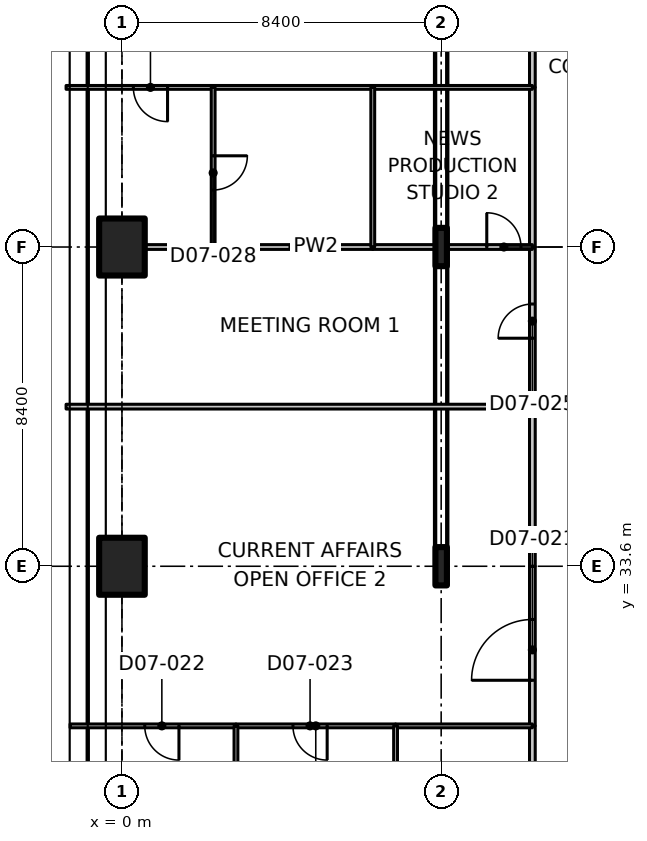
"""IFC4 building model, lengths in metres.
Left out: names, types, materials, properties, quantities, classifications, styles, units other than length and angle.
Written with IfcOpenShell. Run it as: python <this file> out.ifc"""

import sys

from ifc_helpers import new_model, si_unit, direction, frame, frame_2d, origin, origin_2d, place, context, subcontext, project, spatial, polyline, rectangle, i_section, outline, extrude, element, fill, save


model = new_model("IFC4")
c1 = context("Model", 3, precision=1e-05, world=origin(), true_north=direction((0.0, 1.0)))
c2 = subcontext(c1, "Body", "Model", "MODEL_VIEW")
j1 = project(units=[si_unit("LENGTHUNIT", "METRE"), si_unit("PLANEANGLEUNIT", "RADIAN")], contexts=[c1])
p1 = place(None, origin())
s1 = spatial("IfcSite", under=j1, at=p1, CompositionType="ELEMENT")
p2 = place(p1, origin())
s2 = spatial("IfcBuilding", under=s1, at=p2, CompositionType="ELEMENT")
p3 = place(p2, frame((0.0, 0.0, 40.1)))
s3 = spatial("IfcBuildingStorey", under=s2, at=p3, CompositionType="ELEMENT", Elevation=40.1)
for number, where, z_axis, x_axis in (
    (1, (0.0, 33.6, 0.0), (0.0, 0.0, 1.0), (1.0, 0.0, 0.0)),
    (2, (0.0, 42.0, 0.0), (0.0, 0.0, 1.0), (1.0, 0.0, 0.0)),
):
    element("IfcColumn", number, at=place(p3, frame(where, z_axis=z_axis, x_axis=x_axis)), inside=s3, PredefinedType="COLUMN", context=c2, shape_type="SweptSolid", body=[
        extrude(rectangle(XDim=1.2, YDim=1.5, at=origin_2d()), origin(), (0.0, 0.0, 1.0), 3.35),
    ])
for number, where, z_axis, x_axis in (
    (3, (8.4, 33.6, -0.125), (0.0, 0.0, 1.0), (1.0, 0.0, 0.0)),
    (4, (8.4, 42.0, -0.125), (0.0, 0.0, 1.0), (1.0, 0.0, 0.0)),
):
    element("IfcColumn", number, at=place(p3, frame(where, z_axis=z_axis, x_axis=x_axis)), inside=s3, PredefinedType="COLUMN", context=c2, shape_type="SweptSolid", body=[
        extrude(i_section(OverallWidth=0.302, OverallDepth=1.008, WebThickness=0.021, FlangeThickness=0.04, FilletRadius=0.03, at=origin_2d()), origin(), (0.0, 0.0, 1.0), 3.475),
    ])
p4 = place(p3, frame((10.8, 29.4, 0.0), z_axis=(0.0, 0.0, 1.0), x_axis=(0.0, 1.0, 0.0)))
e5 = element("IfcWall", 5, at=p4, inside=s3, PredefinedType="PARTITIONING", context=c2, shape_type="SweptSolid", body=[
    extrude(rectangle(XDim=4.2, YDim=0.15, at=frame_2d((2.1, 0.0))), origin(), (0.0, 0.0, 1.0), 3.33),
])
p5 = place(p4, frame((1.2, 0.0, 0.0)))
e6 = element("IfcOpeningElement", 6, at=p5, cuts=e5, PredefinedType="OPENING", context=c2, shape_type="SweptSolid", body=[
    extrude(rectangle(XDim=1.6, YDim=2.1, at=frame_2d((0.8, 1.05))), frame((0.0, 0.085, 0.0), z_axis=(0.0, -1.0, 0.0), x_axis=(1.0, 0.0, 0.0)), (0.0, 0.0, 1.0), 0.17),
])
for number, where, z_axis, x_axis in (
    (7, (10.8, 25.2, 0.0), (0.0, 0.0, 1.0), (0.0, 1.0, 0.0)),
    (8, (10.8, 33.6, 0.0), (0.0, 0.0, 1.0), (0.0, 1.0, 0.0)),
):
    element("IfcWall", number, at=place(p3, frame(where, z_axis=z_axis, x_axis=x_axis)), inside=s3, PredefinedType="PARTITIONING", context=c2, shape_type="SweptSolid", body=[
        extrude(rectangle(XDim=4.2, YDim=0.15, at=frame_2d((2.1, 0.0))), origin(), (0.0, 0.0, 1.0), 3.33),
    ])
p6 = place(p3, frame((10.8, 37.8, 0.0), z_axis=(0.0, 0.0, 1.0), x_axis=(0.0, 1.0, 0.0)))
e9 = element("IfcWall", 9, at=p6, inside=s3, PredefinedType="PARTITIONING", context=c2, shape_type="SweptSolid", body=[
    extrude(rectangle(XDim=4.2, YDim=0.15, at=frame_2d((2.1, 0.0))), origin(), (0.0, 0.0, 1.0), 3.33),
])
p7 = place(p6, frame((1.8, 0.0, 0.0)))
e10 = element("IfcOpeningElement", 10, at=p7, cuts=e9, PredefinedType="OPENING", context=c2, shape_type="SweptSolid", body=[
    extrude(rectangle(XDim=0.9, YDim=2.1, at=frame_2d((0.45, 1.05))), frame((0.0, 0.085, 0.0), z_axis=(0.0, -1.0, 0.0), x_axis=(1.0, 0.0, 0.0)), (0.0, 0.0, 1.0), 0.17),
])
p8 = place(p3, frame((10.8, 46.2, 0.0), z_axis=(0.0, 0.0, 1.0), x_axis=(0.0, 1.0, 0.0)))
e11 = element("IfcWall", 11, at=p8, inside=s3, PredefinedType="PARTITIONING", context=c2, shape_type="SweptSolid", body=[
    extrude(rectangle(XDim=8.4, YDim=0.15, at=frame_2d((4.2, 0.0))), origin(), (0.0, 0.0, 1.0), 3.33),
])
p9 = place(p8, frame((3.6, 0.0, 0.0)))
e12 = element("IfcOpeningElement", 12, at=p9, cuts=e11, PredefinedType="OPENING", context=c2, shape_type="SweptSolid", body=[
    extrude(rectangle(XDim=1.6, YDim=2.1, at=frame_2d((0.8, 1.05))), frame((0.0, 0.085, 0.0), z_axis=(0.0, -1.0, 0.0), x_axis=(1.0, 0.0, 0.0)), (0.0, 0.0, 1.0), 0.17),
])
p10 = place(p3, frame((10.8, 42.0, 0.0), z_axis=(0.0, 0.0, 1.0), x_axis=(0.0, 1.0, 0.0)))
e13 = element("IfcWall", 13, at=p10, inside=s3, PredefinedType="PARTITIONING", context=c2, shape_type="SweptSolid", body=[
    extrude(rectangle(XDim=4.2, YDim=0.15, at=frame_2d((2.1, 0.0))), origin(), (0.0, 0.0, 1.0), 3.33),
])
p11 = place(p3, frame((3.0, 29.4, 0.0), z_axis=(0.0, 0.0, 1.0), x_axis=(-1.0, 0.0, 0.0)))
e14 = element("IfcWall", 14, at=p11, inside=s3, PredefinedType="PARTITIONING", context=c2, shape_type="SweptSolid", body=[
    extrude(rectangle(XDim=4.365, YDim=0.1, at=frame_2d((2.183, 0.0))), origin(), (0.0, 0.0, 1.0), 2.98),
])
p12 = place(p11, frame((1.5, 0.0, 0.0)))
e15 = element("IfcOpeningElement", 15, at=p12, cuts=e14, PredefinedType="OPENING", context=c2, shape_type="SweptSolid", body=[
    extrude(rectangle(XDim=0.9, YDim=2.1, at=frame_2d((0.45, 1.05))), frame((0.0, 0.06, 0.0), z_axis=(0.0, -1.0, 0.0), x_axis=(1.0, 0.0, 0.0)), (0.0, 0.0, 1.0), 0.12),
])
p13 = place(p3, frame((7.2, 29.4, 0.0), z_axis=(0.0, 0.0, 1.0), x_axis=(-1.0, 0.0, 0.0)))
e16 = element("IfcWall", 16, at=p13, inside=s3, PredefinedType="PARTITIONING", context=c2, shape_type="SweptSolid", body=[
    extrude(rectangle(XDim=4.2, YDim=0.1, at=frame_2d((2.1, 0.0))), origin(), (0.0, 0.0, 1.0), 3.33),
])
p14 = place(p13, frame((1.8, 0.0, 0.0)))
e17 = element("IfcOpeningElement", 17, at=p14, cuts=e16, PredefinedType="OPENING", context=c2, shape_type="SweptSolid", body=[
    extrude(rectangle(XDim=0.9, YDim=2.1, at=frame_2d((0.45, 1.05))), frame((0.0, 0.06, 0.0), z_axis=(0.0, -1.0, 0.0), x_axis=(1.0, 0.0, 0.0)), (0.0, 0.0, 1.0), 0.12),
])
p15 = place(p3, frame((10.8, 29.4, 0.0), z_axis=(0.0, 0.0, 1.0), x_axis=(-1.0, 0.0, 0.0)))
e18 = element("IfcWall", 18, at=p15, inside=s3, PredefinedType="PARTITIONING", context=c2, shape_type="SweptSolid", body=[
    extrude(rectangle(XDim=3.6, YDim=0.1, at=frame_2d((1.8, 0.0))), origin(), (0.0, 0.0, 1.0), 3.33),
])
p16 = place(p3, frame((-1.47, 37.8, 0.0), z_axis=(0.0, 0.0, 1.0), x_axis=(1.0, 0.0, 0.0)))
e19 = element("IfcWall", 19, at=p16, inside=s3, PredefinedType="PARTITIONING", context=c2, shape_type="SweptSolid", body=[
    extrude(outline(polyline([(0.0, 0.0), (12.27, 0.0), (12.27, 3.33), (1.92, 3.33), (1.918, 2.98), (1.022, 2.98), (1.02, 3.33), (0.37, 3.33), (0.0, 3.33), (0.0, 0.0)])), frame((0.0, 0.062, 0.0), z_axis=(0.0, -1.0, 0.0), x_axis=(1.0, 0.0, 0.0)), (0.0, 0.0, 1.0), 0.125),
])
p17 = place(p3, frame((3.0, 29.4, 0.0), z_axis=(0.0, 0.0, 1.0), x_axis=(0.0, -1.0, 0.0)))
e20 = element("IfcWall", 20, at=p17, inside=s3, PredefinedType="PARTITIONING", context=c2, shape_type="SweptSolid", body=[
    extrude(rectangle(XDim=4.2, YDim=0.1, at=frame_2d((2.1, 0.0))), origin(), (0.0, 0.0, 1.0), 3.33),
])
p18 = place(p3, frame((7.2, 29.4, 0.0), z_axis=(0.0, 0.0, 1.0), x_axis=(0.0, -1.0, 0.0)))
e21 = element("IfcWall", 21, at=p18, inside=s3, PredefinedType="PARTITIONING", context=c2, shape_type="SweptSolid", body=[
    extrude(rectangle(XDim=4.2, YDim=0.1, at=frame_2d((2.1, 0.0))), origin(), (0.0, 0.0, 1.0), 3.33),
])
p19 = place(p18, frame((1.5, 0.0, 0.0)))
e22 = element("IfcOpeningElement", 22, at=p19, cuts=e21, PredefinedType="OPENING", context=c2, shape_type="SweptSolid", body=[
    extrude(rectangle(XDim=0.9, YDim=2.1, at=frame_2d((0.45, 1.05))), frame((0.0, 0.06, 0.0), z_axis=(0.0, -1.0, 0.0), x_axis=(1.0, 0.0, 0.0)), (0.0, 0.0, 1.0), 0.12),
])
p20 = place(p3, frame((0.62, 42.0, 0.0), z_axis=(0.0, 0.0, 1.0), x_axis=(1.0, 0.0, 0.0)))
e23 = element("IfcWall", 23, at=p20, inside=s3, PredefinedType="PARTITIONING", context=c2, shape_type="SweptSolid", body=[
    extrude(rectangle(XDim=1.78, YDim=0.125, at=frame_2d((0.89, 0.0))), origin(), (0.0, 0.0, 1.0), 3.33),
])
p21 = place(p3, frame((2.4, 42.0, 0.0), z_axis=(0.0, 0.0, 1.0), x_axis=(1.0, 0.0, 0.0)))
e24 = element("IfcWall", 24, at=p21, inside=s3, PredefinedType="PARTITIONING", context=c2, shape_type="SweptSolid", body=[
    extrude(rectangle(XDim=4.2, YDim=0.125, at=frame_2d((2.1, 0.0))), origin(), (0.0, 0.0, 1.0), 3.33),
])
p22 = place(p3, frame((6.6, 42.0, 0.0), z_axis=(0.0, 0.0, 1.0), x_axis=(1.0, 0.0, 0.0)))
e25 = element("IfcWall", 25, at=p22, inside=s3, PredefinedType="PARTITIONING", context=c2, shape_type="SweptSolid", body=[
    extrude(rectangle(XDim=4.2, YDim=0.125, at=frame_2d((2.1, 0.0))), origin(), (0.0, 0.0, 1.0), 3.33),
])
p23 = place(p22, frame((3.0, 0.0, 0.0)))
e26 = element("IfcOpeningElement", 26, at=p23, cuts=e25, PredefinedType="OPENING", context=c2, shape_type="SweptSolid", body=[
    extrude(rectangle(XDim=0.9, YDim=2.1, at=frame_2d((0.45, 1.05))), frame((0.0, 0.073, 0.0), z_axis=(0.0, -1.0, 0.0), x_axis=(1.0, 0.0, 0.0)), (0.0, 0.0, 1.0), 0.145),
])
p24 = place(p3, frame((2.4, 46.2, 0.0), z_axis=(0.0, 0.0, 1.0), x_axis=(-1.0, 0.0, 0.0)))
e27 = element("IfcWall", 27, at=p24, inside=s3, PredefinedType="PARTITIONING", context=c2, shape_type="SweptSolid", body=[
    extrude(rectangle(XDim=3.87, YDim=0.1, at=frame_2d((1.935, 0.0))), origin(), (0.0, 0.0, 1.0), 2.98),
])
p25 = place(p24, frame((1.2, 0.0, 0.0)))
e28 = element("IfcOpeningElement", 28, at=p25, cuts=e27, PredefinedType="OPENING", context=c2, shape_type="SweptSolid", body=[
    extrude(rectangle(XDim=0.9, YDim=2.1, at=frame_2d((0.45, 1.05))), frame((0.0, 0.06, 0.0), z_axis=(0.0, -1.0, 0.0), x_axis=(1.0, 0.0, 0.0)), (0.0, 0.0, 1.0), 0.12),
])
p26 = place(p3, frame((6.6, 46.2, 0.0), z_axis=(0.0, 0.0, 1.0), x_axis=(-1.0, 0.0, 0.0)))
e29 = element("IfcWall", 29, at=p26, inside=s3, PredefinedType="PARTITIONING", context=c2, shape_type="SweptSolid", body=[
    extrude(rectangle(XDim=4.2, YDim=0.1, at=frame_2d((2.1, 0.0))), origin(), (0.0, 0.0, 1.0), 3.33),
])
p27 = place(p3, frame((10.8, 46.2, 0.0), z_axis=(0.0, 0.0, 1.0), x_axis=(-1.0, 0.0, 0.0)))
e30 = element("IfcWall", 30, at=p27, inside=s3, PredefinedType="PARTITIONING", context=c2, shape_type="SweptSolid", body=[
    extrude(rectangle(XDim=4.2, YDim=0.1, at=frame_2d((2.1, 0.0))), origin(), (0.0, 0.0, 1.0), 3.33),
])
p28 = place(p3, frame((2.4, 46.2, 0.0), z_axis=(0.0, 0.0, 1.0), x_axis=(0.0, -1.0, 0.0)))
e31 = element("IfcWall", 31, at=p28, inside=s3, PredefinedType="PARTITIONING", context=c2, shape_type="SweptSolid", body=[
    extrude(rectangle(XDim=4.2, YDim=0.1, at=frame_2d((2.1, 0.0))), origin(), (0.0, 0.0, 1.0), 3.33),
])
p29 = place(p28, frame((1.8, 0.0, 0.0)))
e32 = element("IfcOpeningElement", 32, at=p29, cuts=e31, PredefinedType="OPENING", context=c2, shape_type="SweptSolid", body=[
    extrude(rectangle(XDim=0.9, YDim=2.1, at=frame_2d((0.45, 1.05))), frame((0.0, 0.06, 0.0), z_axis=(0.0, -1.0, 0.0), x_axis=(1.0, 0.0, 0.0)), (0.0, 0.0, 1.0), 0.12),
])
p30 = place(p3, frame((6.6, 46.2, 0.0), z_axis=(0.0, 0.0, 1.0), x_axis=(0.0, -1.0, 0.0)))
e33 = element("IfcWall", 33, at=p30, inside=s3, PredefinedType="PARTITIONING", context=c2, shape_type="SweptSolid", body=[
    extrude(rectangle(XDim=4.2, YDim=0.1, at=frame_2d((2.1, 0.0))), origin(), (0.0, 0.0, 1.0), 3.33),
])
p31 = place(p5, origin())
e34 = element("IfcDoor", 34, at=p31, inside=s3, OperationType="DOUBLE_DOOR_SINGLE_SWING", PredefinedType="DOOR", context=c2, shape_type="SweptSolid", body=[
    extrude(rectangle(XDim=1.6, YDim=2.1, at=frame_2d((0.8, 1.05))), frame((0.0, 0.025, 0.0), z_axis=(0.0, -1.0, 0.0), x_axis=(1.0, 0.0, 0.0)), (0.0, 0.0, 1.0), 0.05),
])
fill(e6, e34)
p32 = place(p12, origin())
e35 = element("IfcDoor", 35, at=p32, inside=s3, OperationType="SINGLE_SWING_LEFT", PredefinedType="DOOR", context=c2, shape_type="SweptSolid", body=[
    extrude(rectangle(XDim=0.9, YDim=2.1, at=frame_2d((0.45, 1.05))), frame((0.0, 0.025, 0.0), z_axis=(0.0, -1.0, 0.0), x_axis=(1.0, 0.0, 0.0)), (0.0, 0.0, 1.0), 0.05),
])
fill(e15, e35)
p33 = place(p14, origin())
e36 = element("IfcDoor", 36, at=p33, inside=s3, OperationType="SINGLE_SWING_LEFT", PredefinedType="DOOR", context=c2, shape_type="SweptSolid", body=[
    extrude(rectangle(XDim=0.9, YDim=2.1, at=frame_2d((0.45, 1.05))), frame((0.0, 0.025, 0.0), z_axis=(0.0, -1.0, 0.0), x_axis=(1.0, 0.0, 0.0)), (0.0, 0.0, 1.0), 0.05),
])
fill(e17, e36)
p34 = place(p7, origin())
e37 = element("IfcDoor", 37, at=p34, inside=s3, OperationType="SINGLE_SWING_LEFT", PredefinedType="DOOR", context=c2, shape_type="SweptSolid", body=[
    extrude(rectangle(XDim=0.9, YDim=2.1, at=frame_2d((0.45, 1.05))), frame((0.0, 0.025, 0.0), z_axis=(0.0, -1.0, 0.0), x_axis=(1.0, 0.0, 0.0)), (0.0, 0.0, 1.0), 0.05),
])
fill(e10, e37)
p35 = place(p25, origin())
e38 = element("IfcDoor", 38, at=p35, inside=s3, OperationType="SINGLE_SWING_LEFT", PredefinedType="DOOR", context=c2, shape_type="SweptSolid", body=[
    extrude(rectangle(XDim=0.9, YDim=2.1, at=frame_2d((0.45, 1.05))), frame((0.0, 0.025, 0.0), z_axis=(0.0, -1.0, 0.0), x_axis=(1.0, 0.0, 0.0)), (0.0, 0.0, 1.0), 0.05),
])
fill(e28, e38)
p36 = place(p29, origin())
e39 = element("IfcDoor", 39, at=p36, inside=s3, OperationType="SINGLE_SWING_LEFT", PredefinedType="DOOR", context=c2, shape_type="SweptSolid", body=[
    extrude(rectangle(XDim=0.9, YDim=2.1, at=frame_2d((0.45, 1.05))), frame((0.0, 0.025, 0.0), z_axis=(0.0, -1.0, 0.0), x_axis=(1.0, 0.0, 0.0)), (0.0, 0.0, 1.0), 0.05),
])
fill(e32, e39)
p37 = place(p23, origin())
e40 = element("IfcDoor", 40, at=p37, inside=s3, OperationType="SINGLE_SWING_RIGHT", PredefinedType="DOOR", context=c2, shape_type="SweptSolid", body=[
    extrude(rectangle(XDim=0.9, YDim=2.1, at=frame_2d((0.45, 1.05))), frame((0.0, 0.025, 0.0), z_axis=(0.0, -1.0, 0.0), x_axis=(1.0, 0.0, 0.0)), (0.0, 0.0, 1.0), 0.05),
])
fill(e26, e40)
save(model, sys.argv[1])
